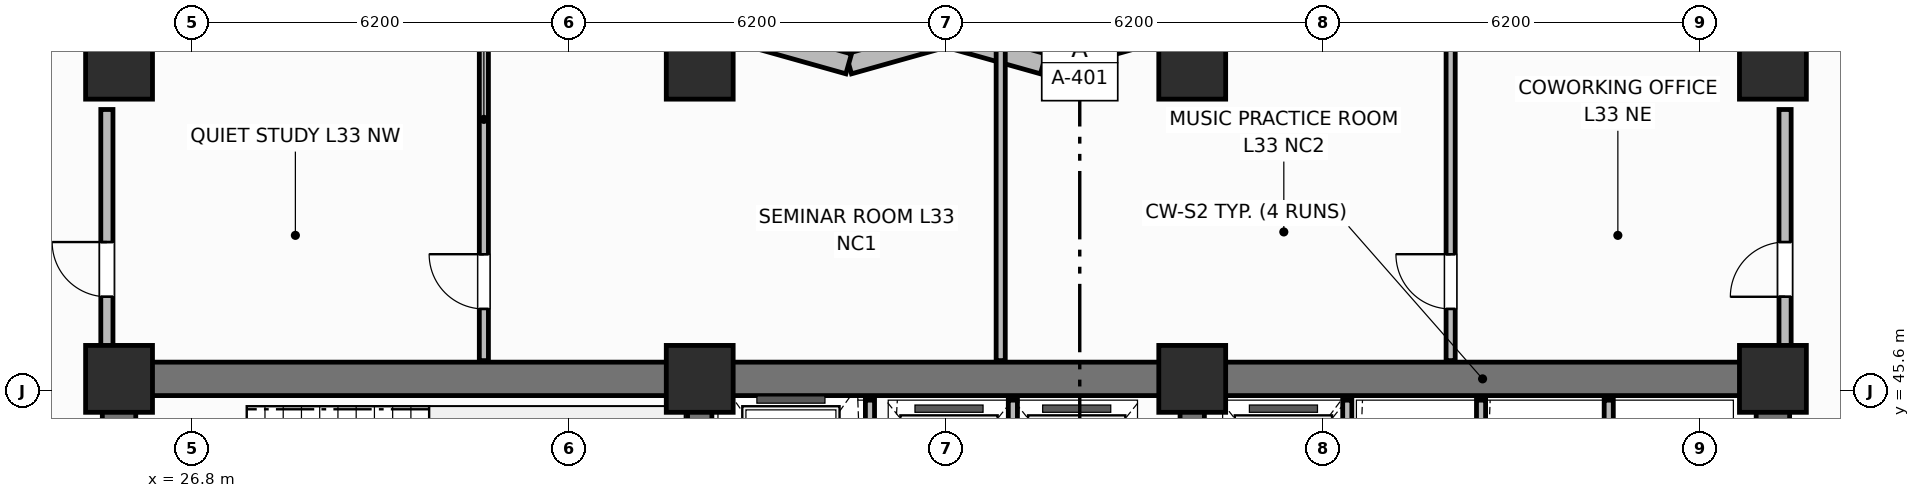
"""IFC4 building model, lengths in metres.
Left out: names, types, materials, properties, quantities, classifications, styles, units other than length and angle.
Written with IfcOpenShell. Run it as: python <this file> out.ifc"""

import sys

from ifc_helpers import new_model, si_unit, direction, frame, frame_2d, origin, origin_2d, place, context, subcontext, project, spatial, rectangle, extrude, element, fill, save


model = new_model("IFC4")
c1 = context("Model", 3, precision=1e-05, world=origin(), true_north=direction((0.0, 1.0)))
c2 = subcontext(c1, "Body", "Model", "MODEL_VIEW")
j1 = project(units=[si_unit("LENGTHUNIT", "METRE"), si_unit("PLANEANGLEUNIT", "RADIAN")], contexts=[c1])
p1 = place(None, origin())
s1 = spatial("IfcSite", under=j1, at=p1, CompositionType="ELEMENT")
p2 = place(p1, origin())
s2 = spatial("IfcBuilding", under=s1, at=p2, CompositionType="ELEMENT")
p3 = place(p2, frame((0.0, 0.0, 132.7)))
s3 = spatial("IfcBuildingStorey", under=s2, at=p3, CompositionType="ELEMENT", Elevation=132.7)
p4 = place(p3, frame((25.6, 45.8, 0.0), z_axis=(0.0, 0.0, 1.0), x_axis=(1.0, 0.0, 0.0)))
e1 = element("IfcWall", 1, at=p4, inside=s3, PredefinedType="SHEAR", context=c2, shape_type="SweptSolid", body=[
    extrude(rectangle(XDim=27.2, YDim=0.55, at=frame_2d((13.6, 0.0))), origin(), (0.0, 0.0, 1.0), 3.7),
])
for number, where, z_axis, x_axis in (
    (2, (25.6, 39.875, 0.0), (0.0, 0.0, 1.0), (0.0, 1.0, 0.0)),
    (3, (52.8, 39.875, 0.0), (0.0, 0.0, 1.0), (0.0, 1.0, 0.0)),
):
    element("IfcWall", number, at=place(p3, frame(where, z_axis=z_axis, x_axis=x_axis)), inside=s3, PredefinedType="SHEAR", context=c2, shape_type="SweptSolid", body=[
        extrude(rectangle(XDim=5.65, YDim=0.55, at=frame_2d((2.825, 0.0))), origin(), (0.0, 0.0, 1.0), 3.7),
    ])
for number, where, z_axis, x_axis in (
    (4, (35.15, 39.875, 0.0), (0.0, 0.0, 1.0), (0.0, 1.0, 0.0)),
    (5, (43.25, 39.875, 0.0), (0.0, 0.0, 1.0), (0.0, 1.0, 0.0)),
):
    element("IfcWall", number, at=place(p3, frame(where, z_axis=z_axis, x_axis=x_axis)), inside=s3, PredefinedType="SHEAR", context=c2, shape_type="SweptSolid", body=[
        extrude(rectangle(XDim=5.65, YDim=0.4, at=frame_2d((2.825, 0.0))), origin(), (0.0, 0.0, 1.0), 3.7),
    ])
for number, where, z_axis, x_axis in (
    (6, (25.6, 45.8, 0.0), (0.0, 0.0, 1.0), (1.0, 0.0, 0.0)),
    (7, (35.15, 45.8, 0.0), (0.0, 0.0, 1.0), (1.0, 0.0, 0.0)),
    (8, (43.25, 45.8, 0.0), (0.0, 0.0, 1.0), (1.0, 0.0, 0.0)),
    (9, (52.8, 45.8, 0.0), (0.0, 0.0, 1.0), (1.0, 0.0, 0.0)),
    (10, (25.6, 50.95, 0.0), (0.0, 0.0, 1.0), (1.0, 0.0, 0.0)),
    (11, (35.15, 50.95, 0.0), (0.0, 0.0, 1.0), (1.0, 0.0, 0.0)),
    (12, (43.25, 50.95, 0.0), (0.0, 0.0, 1.0), (1.0, 0.0, 0.0)),
    (13, (52.8, 50.95, 0.0), (0.0, 0.0, 1.0), (1.0, 0.0, 0.0)),
):
    element("IfcColumn", number, at=place(p3, frame(where, z_axis=z_axis, x_axis=x_axis)), inside=s3, PredefinedType="COLUMN", context=c2, shape_type="SweptSolid", body=[
        extrude(rectangle(XDim=1.1, YDim=1.1, at=origin_2d()), origin(), (0.0, 0.0, 1.0), 3.7),
    ])
p5 = place(p3, frame((42.4, 51.43, 0.0), z_axis=(0.0, 0.0, 1.0), x_axis=(-0.962652136636, -0.270741322725, 0.0)))
e14 = element("IfcWall", 14, at=p5, inside=s3, PredefinedType="SOLIDWALL", context=c2, shape_type="SweptSolid", body=[
    extrude(rectangle(XDim=1.662, YDim=0.34, at=frame_2d((0.831, 0.0))), origin(), (0.0, 0.0, 1.0), 2.66),
])
p6 = place(p3, frame((40.8, 50.98, 0.0), z_axis=(0.0, 0.0, 1.0), x_axis=(-0.962662902433, 0.270703040766, 0.0)))
e15 = element("IfcWall", 15, at=p6, inside=s3, PredefinedType="SOLIDWALL", context=c2, shape_type="SweptSolid", body=[
    extrude(rectangle(XDim=1.662, YDim=0.34, at=frame_2d((0.831, 0.0))), origin(), (0.0, 0.0, 1.0), 2.66),
])
p7 = place(p3, frame((39.2, 51.43, 0.0), z_axis=(0.0, 0.0, 1.0), x_axis=(-0.962652136636, -0.270741322725, 0.0)))
e16 = element("IfcWall", 16, at=p7, inside=s3, PredefinedType="SOLIDWALL", context=c2, shape_type="SweptSolid", body=[
    extrude(rectangle(XDim=1.662, YDim=0.34, at=frame_2d((0.831, 0.0))), origin(), (0.0, 0.0, 1.0), 2.66),
])
p8 = place(p3, frame((37.6, 50.98, 0.0), z_axis=(0.0, 0.0, 1.0), x_axis=(-0.962662902433, 0.270703040766, 0.0)))
e17 = element("IfcWall", 17, at=p8, inside=s3, PredefinedType="SOLIDWALL", context=c2, shape_type="SweptSolid", body=[
    extrude(rectangle(XDim=1.662, YDim=0.34, at=frame_2d((0.831, 0.0))), origin(), (0.0, 0.0, 1.0), 2.66),
])
p9 = place(p3, frame((37.95, 42.6, 0.0), z_axis=(0.0, 0.0, 1.0), x_axis=(0.0, 1.0, 0.0)))
e18 = element("IfcWall", 18, at=p9, inside=s3, PredefinedType="PARTITIONING", context=c2, shape_type="SweptSolid", body=[
    extrude(rectangle(XDim=2.85, YDim=0.15, at=frame_2d((1.425, 0.0))), origin(), (0.0, 0.0, 1.0), 2.49),
])
for number, where, z_axis, x_axis in (
    (19, (40.3, 42.65, 0.0), (0.0, 0.0, 1.0), (0.0, 1.0, 0.0)),
    (20, (45.8, 42.65, 0.0), (0.0, 0.0, 1.0), (0.0, 1.0, 0.0)),
    (21, (48.0, 42.65, 0.0), (0.0, 0.0, 1.0), (0.0, 1.0, 0.0)),
    (22, (50.1, 42.65, 0.0), (0.0, 0.0, 1.0), (0.0, 1.0, 0.0)),
):
    element("IfcWall", number, at=place(p3, frame(where, z_axis=z_axis, x_axis=x_axis)), inside=s3, PredefinedType="PARTITIONING", context=c2, shape_type="SweptSolid", body=[
        extrude(rectangle(XDim=2.8, YDim=0.15, at=frame_2d((1.4, 0.0))), origin(), (0.0, 0.0, 1.0), 2.49),
    ])
p10 = place(p3, frame((31.6, 46.1, 0.0), z_axis=(0.0, 0.0, 1.0), x_axis=(0.0, 1.0, 0.0)))
e23 = element("IfcWall", 23, at=p10, inside=s3, PredefinedType="PARTITIONING", context=c2, shape_type="SweptSolid", body=[
    extrude(rectangle(XDim=5.33, YDim=0.15, at=frame_2d((2.665, 0.0))), origin(), (0.0, 0.0, 1.0), 2.49),
])
p11 = place(p10, frame((0.85, 0.0, 0.0)))
e24 = element("IfcOpeningElement", 24, at=p11, cuts=e23, PredefinedType="OPENING", context=c2, shape_type="SweptSolid", body=[
    extrude(rectangle(XDim=0.9, YDim=2.1, at=frame_2d((0.45, 1.05))), frame((0.0, 0.085, 0.0), z_axis=(0.0, -1.0, 0.0), x_axis=(1.0, 0.0, 0.0)), (0.0, 0.0, 1.0), 0.17),
])
p12 = place(p3, frame((40.1, 46.1, 0.0), z_axis=(0.0, 0.0, 1.0), x_axis=(0.0, 1.0, 0.0)))
e25 = element("IfcWall", 25, at=p12, inside=s3, PredefinedType="PARTITIONING", context=c2, shape_type="SweptSolid", body=[
    extrude(rectangle(XDim=5.33, YDim=0.15, at=frame_2d((2.665, 0.0))), origin(), (0.0, 0.0, 1.0), 2.49),
])
p13 = place(p3, frame((47.5, 46.1, 0.0), z_axis=(0.0, 0.0, 1.0), x_axis=(0.0, 1.0, 0.0)))
e26 = element("IfcWall", 26, at=p13, inside=s3, PredefinedType="PARTITIONING", context=c2, shape_type="SweptSolid", body=[
    extrude(rectangle(XDim=5.33, YDim=0.15, at=frame_2d((2.665, 0.0))), origin(), (0.0, 0.0, 1.0), 2.49),
])
p14 = place(p13, frame((0.85, 0.0, 0.0)))
e27 = element("IfcOpeningElement", 27, at=p14, cuts=e26, PredefinedType="OPENING", context=c2, shape_type="SweptSolid", body=[
    extrude(rectangle(XDim=0.9, YDim=2.1, at=frame_2d((0.45, 1.05))), frame((0.0, 0.085, 0.0), z_axis=(0.0, -1.0, 0.0), x_axis=(1.0, 0.0, 0.0)), (0.0, 0.0, 1.0), 0.17),
])
p15 = place(p3, frame((25.4, 46.1, 0.0), z_axis=(0.0, 0.0, 1.0), x_axis=(0.0, 1.0, 0.0)))
e28 = element("IfcWall", 28, at=p15, inside=s3, PredefinedType="PARTITIONING", context=c2, shape_type="SweptSolid", body=[
    extrude(rectangle(XDim=4.13, YDim=0.2, at=frame_2d((2.065, 0.0))), origin(), (0.0, 0.0, 1.0), 2.49),
])
p16 = place(p15, frame((1.05, 0.0, 0.0)))
e29 = element("IfcOpeningElement", 29, at=p16, cuts=e28, PredefinedType="OPENING", context=c2, shape_type="SweptSolid", body=[
    extrude(rectangle(XDim=0.9, YDim=2.1, at=frame_2d((0.45, 1.05))), frame((0.0, 0.11, 0.0), z_axis=(0.0, -1.0, 0.0), x_axis=(1.0, 0.0, 0.0)), (0.0, 0.0, 1.0), 0.22),
])
p17 = place(p3, frame((53.0, 46.1, 0.0), z_axis=(0.0, 0.0, 1.0), x_axis=(0.0, 1.0, 0.0)))
e30 = element("IfcWall", 30, at=p17, inside=s3, PredefinedType="PARTITIONING", context=c2, shape_type="SweptSolid", body=[
    extrude(rectangle(XDim=4.13, YDim=0.2, at=frame_2d((2.065, 0.0))), origin(), (0.0, 0.0, 1.0), 2.49),
])
p18 = place(p17, frame((1.05, 0.0, 0.0)))
e31 = element("IfcOpeningElement", 31, at=p18, cuts=e30, PredefinedType="OPENING", context=c2, shape_type="SweptSolid", body=[
    extrude(rectangle(XDim=0.9, YDim=2.1, at=frame_2d((0.45, 1.05))), frame((0.0, 0.11, 0.0), z_axis=(0.0, -1.0, 0.0), x_axis=(1.0, 0.0, 0.0)), (0.0, 0.0, 1.0), 0.22),
])
p19 = place(p11, origin())
e32 = element("IfcDoor", 32, at=p19, inside=s3, OperationType="SINGLE_SWING_RIGHT", PredefinedType="DOOR", context=c2, shape_type="SweptSolid", body=[
    extrude(rectangle(XDim=0.9, YDim=2.1, at=frame_2d((0.45, 1.05))), frame((0.0, 0.025, 0.0), z_axis=(0.0, -1.0, 0.0), x_axis=(1.0, 0.0, 0.0)), (0.0, 0.0, 1.0), 0.05),
])
fill(e24, e32)
p20 = place(p14, origin())
e33 = element("IfcDoor", 33, at=p20, inside=s3, OperationType="SINGLE_SWING_RIGHT", PredefinedType="DOOR", context=c2, shape_type="SweptSolid", body=[
    extrude(rectangle(XDim=0.9, YDim=2.1, at=frame_2d((0.45, 1.05))), frame((0.0, 0.025, 0.0), z_axis=(0.0, -1.0, 0.0), x_axis=(1.0, 0.0, 0.0)), (0.0, 0.0, 1.0), 0.05),
])
fill(e27, e33)
p21 = place(p16, origin())
e34 = element("IfcDoor", 34, at=p21, inside=s3, OperationType="SINGLE_SWING_RIGHT", PredefinedType="DOOR", context=c2, shape_type="SweptSolid", body=[
    extrude(rectangle(XDim=0.9, YDim=2.1, at=frame_2d((0.45, 1.05))), frame((0.0, 0.025, 0.0), z_axis=(0.0, -1.0, 0.0), x_axis=(1.0, 0.0, 0.0)), (0.0, 0.0, 1.0), 0.05),
])
fill(e29, e34)
p22 = place(p18, origin())
e35 = element("IfcDoor", 35, at=p22, inside=s3, OperationType="SINGLE_SWING_LEFT", PredefinedType="DOOR", context=c2, shape_type="SweptSolid", body=[
    extrude(rectangle(XDim=0.9, YDim=2.1, at=frame_2d((0.45, 1.05))), frame((0.0, 0.025, 0.0), z_axis=(0.0, -1.0, 0.0), x_axis=(1.0, 0.0, 0.0)), (0.0, 0.0, 1.0), 0.05),
])
fill(e31, e35)
save(model, sys.argv[1])
